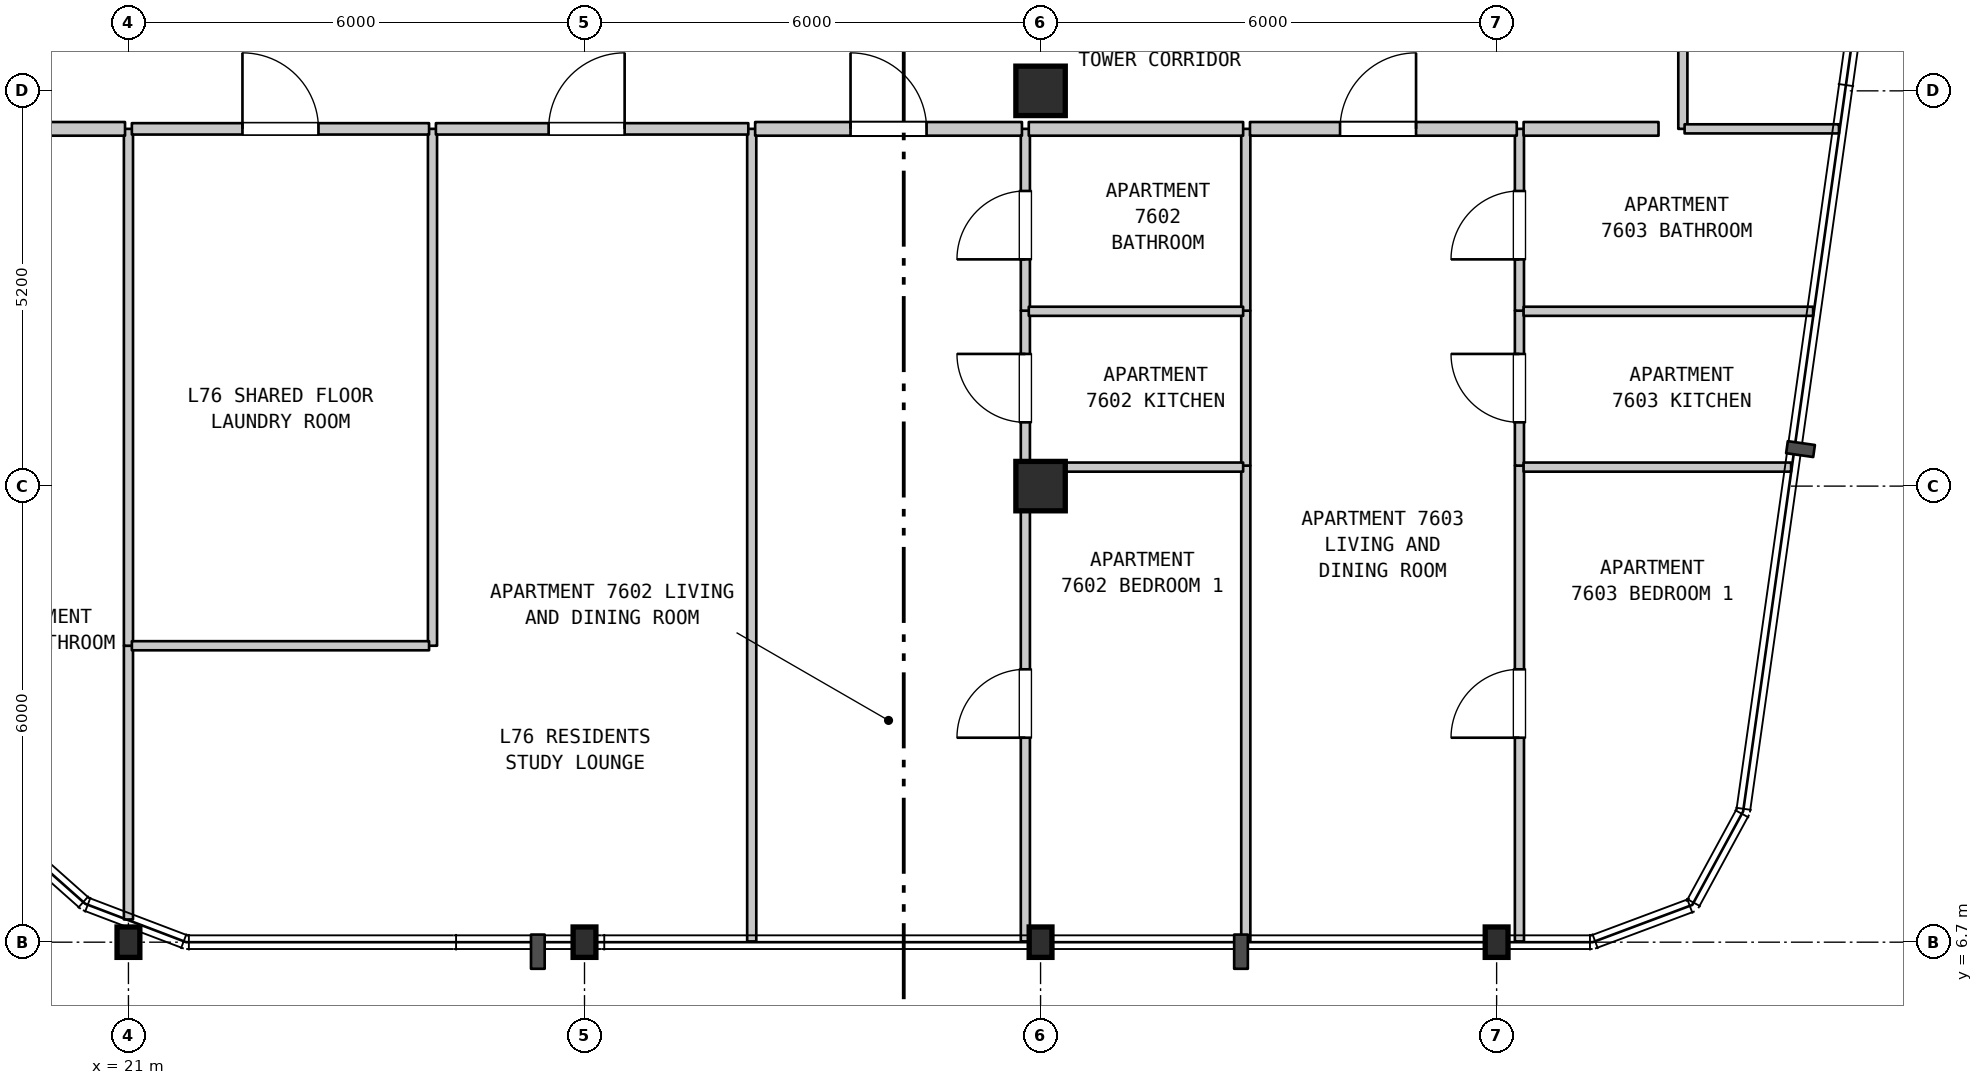
"""IFC4 building model, lengths in metres.
Left out: names, types, materials, properties, quantities, classifications, styles, units other than length and angle.
Written with IfcOpenShell. Run it as: python <this file> out.ifc"""

import sys

from ifc_helpers import new_model, si_unit, direction, frame, frame_2d, origin, origin_2d, place, context, subcontext, project, spatial, rectangle, i_section, extrude, element, fill, save


model = new_model("IFC4")
c1 = context("Model", 3, precision=1e-05, world=origin(), true_north=direction((0.0, 1.0)))
c2 = subcontext(c1, "Body", "Model", "MODEL_VIEW")
j1 = project(units=[si_unit("LENGTHUNIT", "METRE"), si_unit("PLANEANGLEUNIT", "RADIAN")], contexts=[c1])
p1 = place(None, origin())
s1 = spatial("IfcSite", under=j1, at=p1, CompositionType="ELEMENT")
p2 = place(p1, origin())
s2 = spatial("IfcBuilding", under=s1, at=p2, CompositionType="ELEMENT")
p3 = place(p2, frame((0.0, 0.0, 303.6)))
s3 = spatial("IfcBuildingStorey", under=s2, at=p3, CompositionType="ELEMENT", Elevation=303.6)
for number, where, z_axis, x_axis in (
    (1, (21.0, 6.7, 0.0), (0.0, 0.0, 1.0), (1.0, 0.0, 0.0)),
    (2, (27.0, 6.7, 0.0), (0.0, 0.0, 1.0), (1.0, 0.0, 0.0)),
    (3, (33.0, 6.7, 0.0), (0.0, 0.0, 1.0), (1.0, 0.0, 0.0)),
):
    element("IfcColumn", number, at=place(p3, frame(where, z_axis=z_axis, x_axis=x_axis)), inside=s3, PredefinedType="COLUMN", context=c2, shape_type="SweptSolid", body=[
        extrude(i_section(OverallWidth=0.3, OverallDepth=0.4, WebThickness=0.013, FlangeThickness=0.024, FilletRadius=0.027, at=origin_2d()), origin(), (0.0, 0.0, 1.0), 3.7),
    ])
for number, where, z_axis, x_axis in (
    (4, (33.0, 12.7, 0.0), (0.0, 0.0, 1.0), (1.0, 0.0, 0.0)),
    (5, (33.0, 17.9, 0.0), (0.0, 0.0, 1.0), (1.0, 0.0, 0.0)),
):
    element("IfcColumn", number, at=place(p3, frame(where, z_axis=z_axis, x_axis=x_axis)), inside=s3, PredefinedType="COLUMN", context=c2, shape_type="SweptSolid", body=[
        extrude(rectangle(XDim=0.65, YDim=0.65, at=origin_2d()), origin(), (0.0, 0.0, 1.0), 3.7),
    ])
p4 = place(p3, frame((39.0, 6.7, 0.0), z_axis=(0.0, 0.0, 1.0), x_axis=(1.0, 0.0, 0.0)))
e6 = element("IfcColumn", 6, at=p4, inside=s3, PredefinedType="COLUMN", context=c2, shape_type="SweptSolid", body=[
    extrude(i_section(OverallWidth=0.3, OverallDepth=0.4, WebThickness=0.013, FlangeThickness=0.024, FilletRadius=0.027, at=origin_2d()), origin(), (0.0, 0.0, 1.0), 3.7),
])
p5 = place(p3, frame((21.0, 6.999, 0.0), z_axis=(0.0, 0.0, 1.0), x_axis=(0.0, 1.0, 0.0)))
e7 = element("IfcWall", 7, at=p5, inside=s3, PredefinedType="PARTITIONING", context=c2, shape_type="SweptSolid", body=[
    extrude(rectangle(XDim=3.601, YDim=0.12, at=frame_2d((1.801, 0.0))), origin(), (0.0, 0.0, 1.0), 3.39),
])
for number, where, z_axis, x_axis in (
    (8, (21.0, 10.6, 0.0), (0.0, 0.0, 1.0), (0.0, 1.0, 0.0)),
    (9, (25.0, 10.6, 0.0), (0.0, 0.0, 1.0), (0.0, 1.0, 0.0)),
):
    element("IfcWall", number, at=place(p3, frame(where, z_axis=z_axis, x_axis=x_axis)), inside=s3, PredefinedType="PARTITIONING", context=c2, shape_type="SweptSolid", body=[
        extrude(rectangle(XDim=6.8, YDim=0.12, at=frame_2d((3.4, 0.0))), origin(), (0.0, 0.0, 1.0), 3.39),
    ])
p6 = place(p3, frame((29.2, 6.71, 0.0), z_axis=(0.0, 0.0, 1.0), x_axis=(0.0, 1.0, 0.0)))
e10 = element("IfcWall", 10, at=p6, inside=s3, PredefinedType="PARTITIONING", context=c2, shape_type="SweptSolid", body=[
    extrude(rectangle(XDim=10.69, YDim=0.12, at=frame_2d((5.345, 0.0))), origin(), (0.0, 0.0, 1.0), 3.39),
])
p7 = place(p3, frame((32.8, 6.71, 0.0), z_axis=(0.0, 0.0, 1.0), x_axis=(0.0, 1.0, 0.0)))
e11 = element("IfcWall", 11, at=p7, inside=s3, PredefinedType="PARTITIONING", context=c2, shape_type="SweptSolid", body=[
    extrude(rectangle(XDim=6.26, YDim=0.12, at=frame_2d((3.13, 0.0))), origin(), (0.0, 0.0, 1.0), 3.39),
])
p8 = place(p7, frame((2.68, 0.0, 0.0)))
e12 = element("IfcOpeningElement", 12, at=p8, cuts=e11, PredefinedType="OPENING", context=c2, shape_type="SweptSolid", body=[
    extrude(rectangle(XDim=0.9, YDim=2.15, at=frame_2d((0.45, 1.075))), frame((0.0, 0.07, 0.0), z_axis=(0.0, -1.0, 0.0), x_axis=(1.0, 0.0, 0.0)), (0.0, 0.0, 1.0), 0.14),
])
p9 = place(p3, frame((32.8, 12.97, 0.0), z_axis=(0.0, 0.0, 1.0), x_axis=(0.0, 1.0, 0.0)))
e13 = element("IfcWall", 13, at=p9, inside=s3, PredefinedType="PARTITIONING", context=c2, shape_type="SweptSolid", body=[
    extrude(rectangle(XDim=2.038, YDim=0.12, at=frame_2d((1.019, 0.0))), origin(), (0.0, 0.0, 1.0), 3.39),
])
p10 = place(p9, frame((0.569, 0.0, 0.0)))
e14 = element("IfcOpeningElement", 14, at=p10, cuts=e13, PredefinedType="OPENING", context=c2, shape_type="SweptSolid", body=[
    extrude(rectangle(XDim=0.9, YDim=2.15, at=frame_2d((0.45, 1.075))), frame((0.0, 0.07, 0.0), z_axis=(0.0, -1.0, 0.0), x_axis=(1.0, 0.0, 0.0)), (0.0, 0.0, 1.0), 0.14),
])
p11 = place(p3, frame((32.8, 15.008, 0.0), z_axis=(0.0, 0.0, 1.0), x_axis=(0.0, 1.0, 0.0)))
e15 = element("IfcWall", 15, at=p11, inside=s3, PredefinedType="PARTITIONING", context=c2, shape_type="SweptSolid", body=[
    extrude(rectangle(XDim=2.392, YDim=0.12, at=frame_2d((1.196, 0.0))), origin(), (0.0, 0.0, 1.0), 3.39),
])
p12 = place(p11, frame((0.675, 0.0, 0.0)))
e16 = element("IfcOpeningElement", 16, at=p12, cuts=e15, PredefinedType="OPENING", context=c2, shape_type="SweptSolid", body=[
    extrude(rectangle(XDim=0.9, YDim=2.1, at=frame_2d((0.45, 1.05))), frame((0.0, 0.07, 0.0), z_axis=(0.0, -1.0, 0.0), x_axis=(1.0, 0.0, 0.0)), (0.0, 0.0, 1.0), 0.14),
])
p13 = place(p3, frame((35.7, 6.71, 0.0), z_axis=(0.0, 0.0, 1.0), x_axis=(0.0, 1.0, 0.0)))
e17 = element("IfcWall", 17, at=p13, inside=s3, PredefinedType="PARTITIONING", context=c2, shape_type="SweptSolid", body=[
    extrude(rectangle(XDim=6.26, YDim=0.12, at=frame_2d((3.13, 0.0))), origin(), (0.0, 0.0, 1.0), 3.39),
])
p14 = place(p3, frame((35.7, 12.97, 0.0), z_axis=(0.0, 0.0, 1.0), x_axis=(0.0, 1.0, 0.0)))
e18 = element("IfcWall", 18, at=p14, inside=s3, PredefinedType="PARTITIONING", context=c2, shape_type="SweptSolid", body=[
    extrude(rectangle(XDim=2.038, YDim=0.12, at=frame_2d((1.019, 0.0))), origin(), (0.0, 0.0, 1.0), 3.39),
])
p15 = place(p3, frame((35.7, 15.008, 0.0), z_axis=(0.0, 0.0, 1.0), x_axis=(0.0, 1.0, 0.0)))
e19 = element("IfcWall", 19, at=p15, inside=s3, PredefinedType="PARTITIONING", context=c2, shape_type="SweptSolid", body=[
    extrude(rectangle(XDim=2.392, YDim=0.12, at=frame_2d((1.196, 0.0))), origin(), (0.0, 0.0, 1.0), 3.39),
])
p16 = place(p3, frame((39.3, 6.71, 0.0), z_axis=(0.0, 0.0, 1.0), x_axis=(0.0, 1.0, 0.0)))
e20 = element("IfcWall", 20, at=p16, inside=s3, PredefinedType="PARTITIONING", context=c2, shape_type="SweptSolid", body=[
    extrude(rectangle(XDim=6.26, YDim=0.12, at=frame_2d((3.13, 0.0))), origin(), (0.0, 0.0, 1.0), 3.39),
])
p17 = place(p16, frame((2.68, 0.0, 0.0)))
e21 = element("IfcOpeningElement", 21, at=p17, cuts=e20, PredefinedType="OPENING", context=c2, shape_type="SweptSolid", body=[
    extrude(rectangle(XDim=0.9, YDim=2.15, at=frame_2d((0.45, 1.075))), frame((0.0, 0.07, 0.0), z_axis=(0.0, -1.0, 0.0), x_axis=(1.0, 0.0, 0.0)), (0.0, 0.0, 1.0), 0.14),
])
p18 = place(p3, frame((39.3, 12.97, 0.0), z_axis=(0.0, 0.0, 1.0), x_axis=(0.0, 1.0, 0.0)))
e22 = element("IfcWall", 22, at=p18, inside=s3, PredefinedType="PARTITIONING", context=c2, shape_type="SweptSolid", body=[
    extrude(rectangle(XDim=2.038, YDim=0.12, at=frame_2d((1.019, 0.0))), origin(), (0.0, 0.0, 1.0), 3.39),
])
p19 = place(p18, frame((0.569, 0.0, 0.0)))
e23 = element("IfcOpeningElement", 23, at=p19, cuts=e22, PredefinedType="OPENING", context=c2, shape_type="SweptSolid", body=[
    extrude(rectangle(XDim=0.9, YDim=2.15, at=frame_2d((0.45, 1.075))), frame((0.0, 0.07, 0.0), z_axis=(0.0, -1.0, 0.0), x_axis=(1.0, 0.0, 0.0)), (0.0, 0.0, 1.0), 0.14),
])
p20 = place(p3, frame((39.3, 15.008, 0.0), z_axis=(0.0, 0.0, 1.0), x_axis=(0.0, 1.0, 0.0)))
e24 = element("IfcWall", 24, at=p20, inside=s3, PredefinedType="PARTITIONING", context=c2, shape_type="SweptSolid", body=[
    extrude(rectangle(XDim=2.392, YDim=0.12, at=frame_2d((1.196, 0.0))), origin(), (0.0, 0.0, 1.0), 3.39),
])
p21 = place(p20, frame((0.675, 0.0, 0.0)))
e25 = element("IfcOpeningElement", 25, at=p21, cuts=e24, PredefinedType="OPENING", context=c2, shape_type="SweptSolid", body=[
    extrude(rectangle(XDim=0.9, YDim=2.1, at=frame_2d((0.45, 1.05))), frame((0.0, 0.07, 0.0), z_axis=(0.0, -1.0, 0.0), x_axis=(1.0, 0.0, 0.0)), (0.0, 0.0, 1.0), 0.14),
])
p22 = place(p3, frame((41.45, 17.4, 0.0), z_axis=(0.0, 0.0, 1.0), x_axis=(0.0, 1.0, 0.0)))
e26 = element("IfcWall", 26, at=p22, inside=s3, PredefinedType="PARTITIONING", context=c2, shape_type="SweptSolid", body=[
    extrude(rectangle(XDim=2.099, YDim=0.12, at=frame_2d((1.05, 0.0))), origin(), (0.0, 0.0, 1.0), 3.39),
])
p23 = place(p3, frame((21.045, 10.6, 0.0), z_axis=(0.0, 0.0, 1.0), x_axis=(1.0, 0.0, 0.0)))
e27 = element("IfcWall", 27, at=p23, inside=s3, PredefinedType="PARTITIONING", context=c2, shape_type="SweptSolid", body=[
    extrude(rectangle(XDim=3.91, YDim=0.12, at=frame_2d((1.955, 0.0))), origin(), (0.0, 0.0, 1.0), 3.39),
])
p24 = place(p3, frame((32.845, 12.95, 0.0), z_axis=(0.0, 0.0, 1.0), x_axis=(1.0, 0.0, 0.0)))
e28 = element("IfcWall", 28, at=p24, inside=s3, PredefinedType="PARTITIONING", context=c2, shape_type="SweptSolid", body=[
    extrude(rectangle(XDim=2.82, YDim=0.12, at=frame_2d((1.41, 0.0))), origin(), (0.0, 0.0, 1.0), 3.39),
])
p25 = place(p3, frame((39.355, 12.95, 0.0), z_axis=(0.0, 0.0, 1.0), x_axis=(1.0, 0.0, 0.0)))
e29 = element("IfcWall", 29, at=p25, inside=s3, PredefinedType="PARTITIONING", context=c2, shape_type="SweptSolid", body=[
    extrude(rectangle(XDim=3.519, YDim=0.12, at=frame_2d((1.76, 0.0))), origin(), (0.0, 0.0, 1.0), 3.39),
])
p26 = place(p3, frame((32.845, 15.0, 0.0), z_axis=(0.0, 0.0, 1.0), x_axis=(1.0, 0.0, 0.0)))
e30 = element("IfcWall", 30, at=p26, inside=s3, PredefinedType="PARTITIONING", context=c2, shape_type="SweptSolid", body=[
    extrude(rectangle(XDim=2.82, YDim=0.12, at=frame_2d((1.41, 0.0))), origin(), (0.0, 0.0, 1.0), 3.39),
])
p27 = place(p3, frame((39.355, 15.0, 0.0), z_axis=(0.0, 0.0, 1.0), x_axis=(1.0, 0.0, 0.0)))
e31 = element("IfcWall", 31, at=p27, inside=s3, PredefinedType="PARTITIONING", context=c2, shape_type="SweptSolid", body=[
    extrude(rectangle(XDim=3.809, YDim=0.12, at=frame_2d((1.905, 0.0))), origin(), (0.0, 0.0, 1.0), 3.39),
])
p28 = place(p3, frame((19.095, 17.4, 0.0), z_axis=(0.0, 0.0, 1.0), x_axis=(1.0, 0.0, 0.0)))
e32 = element("IfcWall", 32, at=p28, inside=s3, PredefinedType="STANDARD", context=c2, shape_type="SweptSolid", body=[
    extrude(rectangle(XDim=1.86, YDim=0.18, at=frame_2d((0.93, 0.0))), origin(), (0.0, 0.0, 1.0), 3.39),
])
p29 = place(p3, frame((21.045, 17.4, 0.0), z_axis=(0.0, 0.0, 1.0), x_axis=(1.0, 0.0, 0.0)))
e33 = element("IfcWall", 33, at=p29, inside=s3, PredefinedType="STANDARD", context=c2, shape_type="SweptSolid", body=[
    extrude(rectangle(XDim=3.91, YDim=0.15, at=frame_2d((1.955, 0.0))), origin(), (0.0, 0.0, 1.0), 3.39),
])
p30 = place(p29, frame((1.455, 0.0, 0.0)))
e34 = element("IfcOpeningElement", 34, at=p30, cuts=e33, PredefinedType="OPENING", context=c2, shape_type="SweptSolid", body=[
    extrude(rectangle(XDim=1.0, YDim=2.15, at=frame_2d((0.5, 1.075))), frame((0.0, 0.085, 0.0), z_axis=(0.0, -1.0, 0.0), x_axis=(1.0, 0.0, 0.0)), (0.0, 0.0, 1.0), 0.17),
])
p31 = place(p3, frame((25.045, 17.4, 0.0), z_axis=(0.0, 0.0, 1.0), x_axis=(1.0, 0.0, 0.0)))
e35 = element("IfcWall", 35, at=p31, inside=s3, PredefinedType="STANDARD", context=c2, shape_type="SweptSolid", body=[
    extrude(rectangle(XDim=4.11, YDim=0.15, at=frame_2d((2.055, 0.0))), origin(), (0.0, 0.0, 1.0), 3.39),
])
p32 = place(p31, frame((1.483, 0.0, 0.0)))
e36 = element("IfcOpeningElement", 36, at=p32, cuts=e35, PredefinedType="OPENING", context=c2, shape_type="SweptSolid", body=[
    extrude(rectangle(XDim=1.0, YDim=2.15, at=frame_2d((0.5, 1.075))), frame((0.0, 0.085, 0.0), z_axis=(0.0, -1.0, 0.0), x_axis=(1.0, 0.0, 0.0)), (0.0, 0.0, 1.0), 0.17),
])
p33 = place(p3, frame((29.245, 17.4, 0.0), z_axis=(0.0, 0.0, 1.0), x_axis=(1.0, 0.0, 0.0)))
e37 = element("IfcWall", 37, at=p33, inside=s3, PredefinedType="STANDARD", context=c2, shape_type="SweptSolid", body=[
    extrude(rectangle(XDim=3.51, YDim=0.18, at=frame_2d((1.755, 0.0))), origin(), (0.0, 0.0, 1.0), 3.39),
])
p34 = place(p33, frame((1.255, 0.0, 0.0)))
e38 = element("IfcOpeningElement", 38, at=p34, cuts=e37, PredefinedType="OPENING", context=c2, shape_type="SweptSolid", body=[
    extrude(rectangle(XDim=1.0, YDim=2.15, at=frame_2d((0.5, 1.075))), frame((0.0, 0.1, 0.0), z_axis=(0.0, -1.0, 0.0), x_axis=(1.0, 0.0, 0.0)), (0.0, 0.0, 1.0), 0.2),
])
p35 = place(p3, frame((32.845, 17.4, 0.0), z_axis=(0.0, 0.0, 1.0), x_axis=(1.0, 0.0, 0.0)))
e39 = element("IfcWall", 39, at=p35, inside=s3, PredefinedType="STANDARD", context=c2, shape_type="SweptSolid", body=[
    extrude(rectangle(XDim=2.82, YDim=0.18, at=frame_2d((1.41, 0.0))), origin(), (0.0, 0.0, 1.0), 3.39),
])
p36 = place(p3, frame((35.755, 17.4, 0.0), z_axis=(0.0, 0.0, 1.0), x_axis=(1.0, 0.0, 0.0)))
e40 = element("IfcWall", 40, at=p36, inside=s3, PredefinedType="STANDARD", context=c2, shape_type="SweptSolid", body=[
    extrude(rectangle(XDim=3.51, YDim=0.18, at=frame_2d((1.755, 0.0))), origin(), (0.0, 0.0, 1.0), 3.39),
])
p37 = place(p36, frame((1.185, 0.0, 0.0)))
e41 = element("IfcOpeningElement", 41, at=p37, cuts=e40, PredefinedType="OPENING", context=c2, shape_type="SweptSolid", body=[
    extrude(rectangle(XDim=1.0, YDim=2.15, at=frame_2d((0.5, 1.075))), frame((0.0, 0.1, 0.0), z_axis=(0.0, -1.0, 0.0), x_axis=(1.0, 0.0, 0.0)), (0.0, 0.0, 1.0), 0.2),
])
p38 = place(p3, frame((39.355, 17.4, 0.0), z_axis=(0.0, 0.0, 1.0), x_axis=(1.0, 0.0, 0.0)))
e42 = element("IfcWall", 42, at=p38, inside=s3, PredefinedType="STANDARD", context=c2, shape_type="SweptSolid", body=[
    extrude(rectangle(XDim=1.775, YDim=0.18, at=frame_2d((0.887, 0.0))), origin(), (0.0, 0.0, 1.0), 3.39),
])
p39 = place(p3, frame((41.473, 17.4, 0.0), z_axis=(0.0, 0.0, 1.0), x_axis=(1.0, 0.0, 0.0)))
e43 = element("IfcWall", 43, at=p39, inside=s3, PredefinedType="PARTITIONING", context=c2, shape_type="SweptSolid", body=[
    extrude(rectangle(XDim=2.031, YDim=0.12, at=frame_2d((1.016, 0.0))), origin(), (0.0, 0.0, 1.0), 3.39),
])
p40 = place(p8, origin())
e44 = element("IfcDoor", 44, at=p40, inside=s3, OperationType="SINGLE_SWING_LEFT", PredefinedType="DOOR", context=c2, shape_type="SweptSolid", body=[
    extrude(rectangle(XDim=0.9, YDim=2.15, at=frame_2d((0.45, 1.075))), frame((0.0, 0.025, 0.0), z_axis=(0.0, -1.0, 0.0), x_axis=(1.0, 0.0, 0.0)), (0.0, 0.0, 1.0), 0.05),
])
fill(e12, e44)
p41 = place(p10, origin())
e45 = element("IfcDoor", 45, at=p41, inside=s3, OperationType="SINGLE_SWING_RIGHT", PredefinedType="DOOR", context=c2, shape_type="SweptSolid", body=[
    extrude(rectangle(XDim=0.9, YDim=2.15, at=frame_2d((0.45, 1.075))), frame((0.0, 0.025, 0.0), z_axis=(0.0, -1.0, 0.0), x_axis=(1.0, 0.0, 0.0)), (0.0, 0.0, 1.0), 0.05),
])
fill(e14, e45)
p42 = place(p12, origin())
e46 = element("IfcDoor", 46, at=p42, inside=s3, OperationType="SINGLE_SWING_LEFT", PredefinedType="DOOR", context=c2, shape_type="SweptSolid", body=[
    extrude(rectangle(XDim=0.9, YDim=2.1, at=frame_2d((0.45, 1.05))), frame((0.0, 0.025, 0.0), z_axis=(0.0, -1.0, 0.0), x_axis=(1.0, 0.0, 0.0)), (0.0, 0.0, 1.0), 0.05),
])
fill(e16, e46)
p43 = place(p17, origin())
e47 = element("IfcDoor", 47, at=p43, inside=s3, OperationType="SINGLE_SWING_LEFT", PredefinedType="DOOR", context=c2, shape_type="SweptSolid", body=[
    extrude(rectangle(XDim=0.9, YDim=2.15, at=frame_2d((0.45, 1.075))), frame((0.0, 0.025, 0.0), z_axis=(0.0, -1.0, 0.0), x_axis=(1.0, 0.0, 0.0)), (0.0, 0.0, 1.0), 0.05),
])
fill(e21, e47)
p44 = place(p19, origin())
e48 = element("IfcDoor", 48, at=p44, inside=s3, OperationType="SINGLE_SWING_RIGHT", PredefinedType="DOOR", context=c2, shape_type="SweptSolid", body=[
    extrude(rectangle(XDim=0.9, YDim=2.15, at=frame_2d((0.45, 1.075))), frame((0.0, 0.025, 0.0), z_axis=(0.0, -1.0, 0.0), x_axis=(1.0, 0.0, 0.0)), (0.0, 0.0, 1.0), 0.05),
])
fill(e23, e48)
p45 = place(p21, origin())
e49 = element("IfcDoor", 49, at=p45, inside=s3, OperationType="SINGLE_SWING_LEFT", PredefinedType="DOOR", context=c2, shape_type="SweptSolid", body=[
    extrude(rectangle(XDim=0.9, YDim=2.1, at=frame_2d((0.45, 1.05))), frame((0.0, 0.025, 0.0), z_axis=(0.0, -1.0, 0.0), x_axis=(1.0, 0.0, 0.0)), (0.0, 0.0, 1.0), 0.05),
])
fill(e25, e49)
p46 = place(p30, origin())
e50 = element("IfcDoor", 50, at=p46, inside=s3, OperationType="SINGLE_SWING_LEFT", PredefinedType="DOOR", context=c2, shape_type="SweptSolid", body=[
    extrude(rectangle(XDim=1.0, YDim=2.15, at=frame_2d((0.5, 1.075))), frame((0.0, 0.025, 0.0), z_axis=(0.0, -1.0, 0.0), x_axis=(1.0, 0.0, 0.0)), (0.0, 0.0, 1.0), 0.05),
])
fill(e34, e50)
p47 = place(p32, origin())
e51 = element("IfcDoor", 51, at=p47, inside=s3, OperationType="SINGLE_SWING_RIGHT", PredefinedType="DOOR", context=c2, shape_type="SweptSolid", body=[
    extrude(rectangle(XDim=1.0, YDim=2.15, at=frame_2d((0.5, 1.075))), frame((0.0, 0.025, 0.0), z_axis=(0.0, -1.0, 0.0), x_axis=(1.0, 0.0, 0.0)), (0.0, 0.0, 1.0), 0.05),
])
fill(e36, e51)
p48 = place(p34, origin())
e52 = element("IfcDoor", 52, at=p48, inside=s3, OperationType="SINGLE_SWING_LEFT", PredefinedType="DOOR", context=c2, shape_type="SweptSolid", body=[
    extrude(rectangle(XDim=1.0, YDim=2.15, at=frame_2d((0.5, 1.075))), frame((0.0, 0.025, 0.0), z_axis=(0.0, -1.0, 0.0), x_axis=(1.0, 0.0, 0.0)), (0.0, 0.0, 1.0), 0.05),
])
fill(e38, e52)
p49 = place(p37, origin())
e53 = element("IfcDoor", 53, at=p49, inside=s3, OperationType="SINGLE_SWING_RIGHT", PredefinedType="DOOR", context=c2, shape_type="SweptSolid", body=[
    extrude(rectangle(XDim=1.0, YDim=2.15, at=frame_2d((0.5, 1.075))), frame((0.0, 0.025, 0.0), z_axis=(0.0, -1.0, 0.0), x_axis=(1.0, 0.0, 0.0)), (0.0, 0.0, 1.0), 0.05),
])
fill(e41, e53)
save(model, sys.argv[1])
